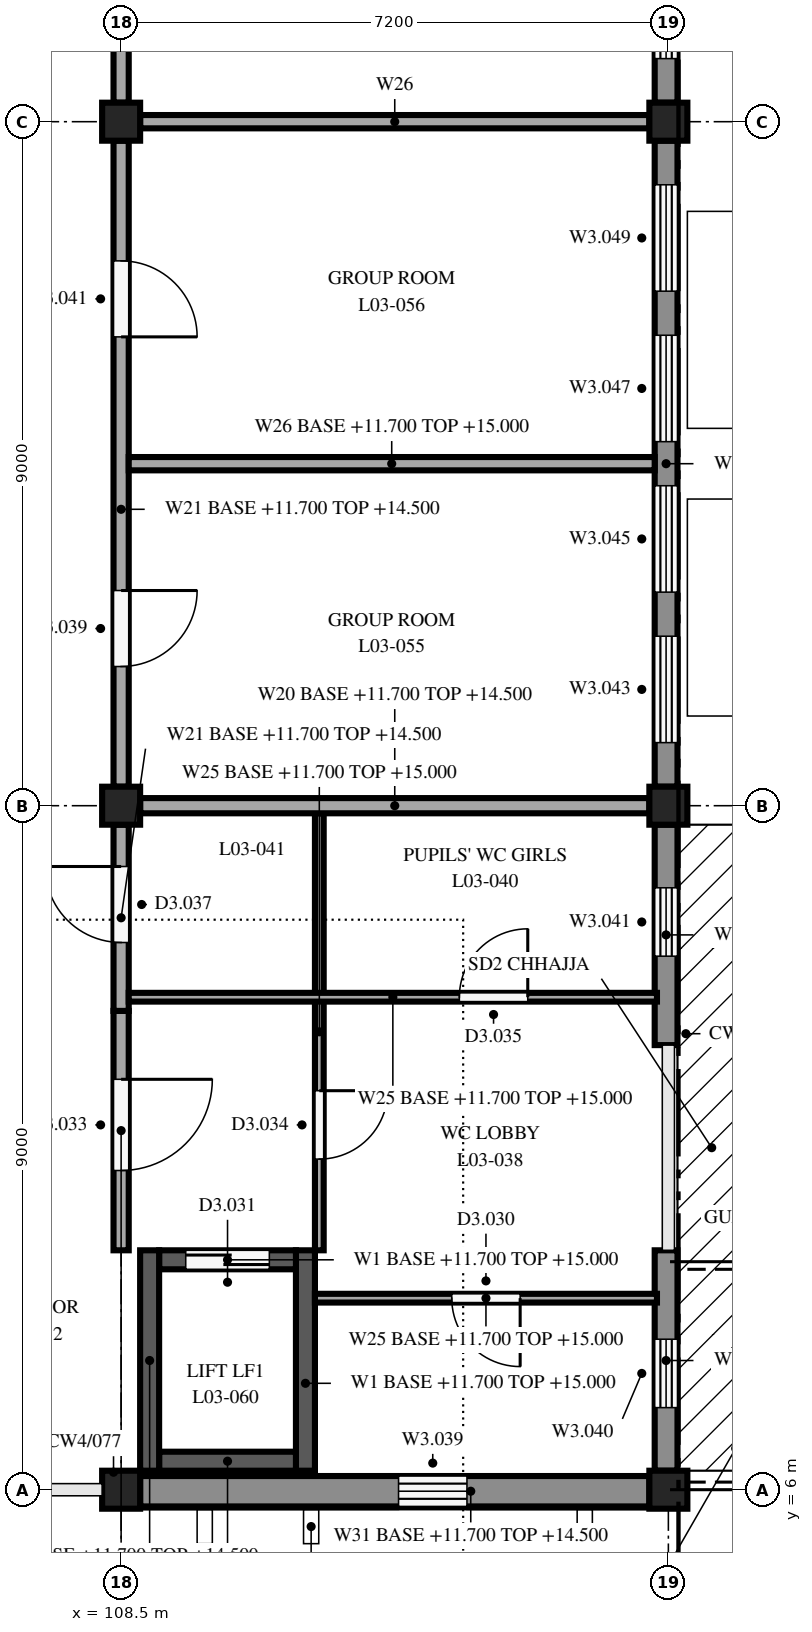
"""IFC4 building model, lengths in metres.
Left out: names, types, materials, properties, quantities, classifications, styles, units other than length and angle.
Written with IfcOpenShell. Run it as: python <this file> out.ifc"""

import sys

from ifc_helpers import new_model, si_unit, direction, frame, frame_2d, origin, origin_2d, place, context, subcontext, project, spatial, rectangle, extrude, element, fill, save


model = new_model("IFC4")
c1 = context("Model", 3, precision=1e-05, world=origin(), true_north=direction((0.0, 1.0)))
c2 = subcontext(c1, "Body", "Model", "MODEL_VIEW")
j1 = project(units=[si_unit("LENGTHUNIT", "METRE"), si_unit("PLANEANGLEUNIT", "RADIAN")], contexts=[c1])
p1 = place(None, origin())
s1 = spatial("IfcSite", under=j1, at=p1, CompositionType="ELEMENT")
p2 = place(p1, origin())
s2 = spatial("IfcBuilding", under=s1, at=p2, CompositionType="ELEMENT")
p3 = place(p2, frame((0.0, 0.0, 11.7)))
s3 = spatial("IfcBuildingStorey", under=s2, at=p3, CompositionType="ELEMENT", Elevation=11.7)
for number, where, z_axis, x_axis in (
    (1, (108.5, 6.0, 0.0), (0.0, 0.0, 1.0), (1.0, 0.0, 0.0)),
    (2, (108.5, 15.0, 0.0), (0.0, 0.0, 1.0), (1.0, 0.0, 0.0)),
    (3, (108.5, 24.0, 0.0), (0.0, 0.0, 1.0), (1.0, 0.0, 0.0)),
    (4, (115.7, 6.0, 0.0), (0.0, 0.0, 1.0), (1.0, 0.0, 0.0)),
    (5, (115.7, 15.0, 0.0), (0.0, 0.0, 1.0), (1.0, 0.0, 0.0)),
    (6, (115.7, 24.0, 0.0), (0.0, 0.0, 1.0), (1.0, 0.0, 0.0)),
):
    element("IfcColumn", number, at=place(p3, frame(where, z_axis=z_axis, x_axis=x_axis)), inside=s3, PredefinedType="COLUMN", context=c2, shape_type="SweptSolid", body=[
        extrude(rectangle(XDim=0.5, YDim=0.5, at=origin_2d()), origin(), (0.0, 0.0, 1.0), 3.3),
    ])
for number, where, z_axis, x_axis in (
    (7, (108.875, 6.25, 0.0), (0.0, 0.0, 1.0), (0.0, 1.0, 0.0)),
    (8, (110.925, 6.25, 0.0), (0.0, 0.0, 1.0), (0.0, 1.0, 0.0)),
):
    element("IfcWall", number, at=place(p3, frame(where, z_axis=z_axis, x_axis=x_axis)), inside=s3, PredefinedType="SHEAR", context=c2, shape_type="SweptSolid", body=[
        extrude(rectangle(XDim=2.9, YDim=0.25, at=frame_2d((1.45, 0.0))), origin(), (0.0, 0.0, 1.0), 3.3),
    ])
p4 = place(p3, frame((109.0, 6.375, 0.0), z_axis=(0.0, 0.0, 1.0), x_axis=(1.0, 0.0, 0.0)))
e9 = element("IfcWall", 9, at=p4, inside=s3, PredefinedType="SHEAR", context=c2, shape_type="SweptSolid", body=[
    extrude(rectangle(XDim=1.8, YDim=0.25, at=frame_2d((0.9, 0.0))), origin(), (0.0, 0.0, 1.0), 3.3),
])
p5 = place(p3, frame((109.0, 9.025, 0.0), z_axis=(0.0, 0.0, 1.0), x_axis=(1.0, 0.0, 0.0)))
e10 = element("IfcWall", 10, at=p5, inside=s3, PredefinedType="SHEAR", context=c2, shape_type="SweptSolid", body=[
    extrude(rectangle(XDim=1.8, YDim=0.25, at=frame_2d((0.9, 0.0))), origin(), (0.0, 0.0, 1.0), 3.3),
])
p6 = place(p5, frame((0.35, 0.0, 0.0)))
e11 = element("IfcOpeningElement", 11, at=p6, cuts=e10, PredefinedType="OPENING", context=c2, shape_type="SweptSolid", body=[
    extrude(rectangle(XDim=1.1, YDim=2.1, at=frame_2d((0.55, 1.05))), frame((0.0, 0.135, 0.0), z_axis=(0.0, -1.0, 0.0), x_axis=(1.0, 0.0, 0.0)), (0.0, 0.0, 1.0), 0.27),
])
p7 = place(p3, frame((115.67, 9.15, 0.0), z_axis=(0.0, 0.0, 1.0), x_axis=(0.0, -1.0, 0.0)))
e12 = element("IfcWall", 12, at=p7, inside=s3, PredefinedType="STANDARD", context=c2, shape_type="SweptSolid", body=[
    extrude(rectangle(XDim=2.9, YDim=0.3, at=frame_2d((1.45, 0.0))), origin(), (0.0, 0.0, 1.0), 2.75),
])
p8 = place(p7, frame((1.17, 0.0, 1.6)))
e13 = element("IfcOpeningElement", 13, at=p8, cuts=e12, PredefinedType="OPENING", context=c2, shape_type="SweptSolid", body=[
    extrude(rectangle(XDim=0.9, YDim=1.0, at=frame_2d((0.45, 0.5))), frame((0.0, 0.16, 0.0), z_axis=(0.0, -1.0, 0.0), x_axis=(1.0, 0.0, 0.0)), (0.0, 0.0, 1.0), 0.32),
])
p9 = place(p3, frame((115.67, 14.75, 0.0), z_axis=(0.0, 0.0, 1.0), x_axis=(0.0, -1.0, 0.0)))
e14 = element("IfcWall", 14, at=p9, inside=s3, PredefinedType="STANDARD", context=c2, shape_type="SweptSolid", body=[
    extrude(rectangle(XDim=2.9, YDim=0.3, at=frame_2d((1.45, 0.0))), origin(), (0.0, 0.0, 1.0), 2.75),
])
p10 = place(p9, frame((0.83, 0.0, 1.6)))
e15 = element("IfcOpeningElement", 15, at=p10, cuts=e14, PredefinedType="OPENING", context=c2, shape_type="SweptSolid", body=[
    extrude(rectangle(XDim=0.9, YDim=1.0, at=frame_2d((0.45, 0.5))), frame((0.0, 0.16, 0.0), z_axis=(0.0, -1.0, 0.0), x_axis=(1.0, 0.0, 0.0)), (0.0, 0.0, 1.0), 0.32),
])
p11 = place(p3, frame((115.67, 23.75, 0.0), z_axis=(0.0, 0.0, 1.0), x_axis=(0.0, -1.0, 0.0)))
e16 = element("IfcWall", 16, at=p11, inside=s3, PredefinedType="STANDARD", context=c2, shape_type="SweptSolid", body=[
    extrude(rectangle(XDim=8.5, YDim=0.3, at=frame_2d((4.25, 0.0))), origin(), (0.0, 0.0, 1.0), 2.75),
])
p12 = place(p11, frame((6.52, 0.0, 0.6)))
e17 = element("IfcOpeningElement", 17, at=p12, cuts=e16, PredefinedType="OPENING", context=c2, shape_type="SweptSolid", body=[
    extrude(rectangle(XDim=1.4, YDim=2.1, at=frame_2d((0.7, 1.05))), frame((0.0, 0.16, 0.0), z_axis=(0.0, -1.0, 0.0), x_axis=(1.0, 0.0, 0.0)), (0.0, 0.0, 1.0), 0.32),
])
p13 = place(p11, frame((4.54, 0.0, 0.6)))
e18 = element("IfcOpeningElement", 18, at=p13, cuts=e16, PredefinedType="OPENING", context=c2, shape_type="SweptSolid", body=[
    extrude(rectangle(XDim=1.4, YDim=2.1, at=frame_2d((0.7, 1.05))), frame((0.0, 0.16, 0.0), z_axis=(0.0, -1.0, 0.0), x_axis=(1.0, 0.0, 0.0)), (0.0, 0.0, 1.0), 0.32),
])
p14 = place(p11, frame((2.56, 0.0, 0.6)))
e19 = element("IfcOpeningElement", 19, at=p14, cuts=e16, PredefinedType="OPENING", context=c2, shape_type="SweptSolid", body=[
    extrude(rectangle(XDim=1.4, YDim=2.1, at=frame_2d((0.7, 1.05))), frame((0.0, 0.16, 0.0), z_axis=(0.0, -1.0, 0.0), x_axis=(1.0, 0.0, 0.0)), (0.0, 0.0, 1.0), 0.32),
])
p15 = place(p11, frame((0.58, 0.0, 0.6)))
e20 = element("IfcOpeningElement", 20, at=p15, cuts=e16, PredefinedType="OPENING", context=c2, shape_type="SweptSolid", body=[
    extrude(rectangle(XDim=1.4, YDim=2.1, at=frame_2d((0.7, 1.05))), frame((0.0, 0.16, 0.0), z_axis=(0.0, -1.0, 0.0), x_axis=(1.0, 0.0, 0.0)), (0.0, 0.0, 1.0), 0.32),
])
p16 = place(p3, frame((115.67, 32.75, 0.0), z_axis=(0.0, 0.0, 1.0), x_axis=(0.0, -1.0, 0.0)))
e21 = element("IfcWall", 21, at=p16, inside=s3, PredefinedType="STANDARD", context=c2, shape_type="SweptSolid", body=[
    extrude(rectangle(XDim=8.5, YDim=0.3, at=frame_2d((4.25, 0.0))), origin(), (0.0, 0.0, 1.0), 2.75),
])
p17 = place(p16, frame((6.52, 0.0, 0.6)))
e22 = element("IfcOpeningElement", 22, at=p17, cuts=e21, PredefinedType="OPENING", context=c2, shape_type="SweptSolid", body=[
    extrude(rectangle(XDim=1.4, YDim=2.1, at=frame_2d((0.7, 1.05))), frame((0.0, 0.16, 0.0), z_axis=(0.0, -1.0, 0.0), x_axis=(1.0, 0.0, 0.0)), (0.0, 0.0, 1.0), 0.32),
])
p18 = place(p16, frame((4.54, 0.0, 0.6)))
e23 = element("IfcOpeningElement", 23, at=p18, cuts=e21, PredefinedType="OPENING", context=c2, shape_type="SweptSolid", body=[
    extrude(rectangle(XDim=1.4, YDim=2.1, at=frame_2d((0.7, 1.05))), frame((0.0, 0.16, 0.0), z_axis=(0.0, -1.0, 0.0), x_axis=(1.0, 0.0, 0.0)), (0.0, 0.0, 1.0), 0.32),
])
p19 = place(p16, frame((2.56, 0.0, 0.6)))
e24 = element("IfcOpeningElement", 24, at=p19, cuts=e21, PredefinedType="OPENING", context=c2, shape_type="SweptSolid", body=[
    extrude(rectangle(XDim=1.4, YDim=2.1, at=frame_2d((0.7, 1.05))), frame((0.0, 0.16, 0.0), z_axis=(0.0, -1.0, 0.0), x_axis=(1.0, 0.0, 0.0)), (0.0, 0.0, 1.0), 0.32),
])
p20 = place(p16, frame((0.58, 0.0, 0.6)))
e25 = element("IfcOpeningElement", 25, at=p20, cuts=e21, PredefinedType="OPENING", context=c2, shape_type="SweptSolid", body=[
    extrude(rectangle(XDim=1.4, YDim=2.1, at=frame_2d((0.7, 1.05))), frame((0.0, 0.16, 0.0), z_axis=(0.0, -1.0, 0.0), x_axis=(1.0, 0.0, 0.0)), (0.0, 0.0, 1.0), 0.32),
])
p21 = place(p3, frame((115.45, 5.98, 0.0), z_axis=(0.0, 0.0, 1.0), x_axis=(-1.0, 0.0, 0.0)))
e26 = element("IfcWall", 26, at=p21, inside=s3, PredefinedType="STANDARD", context=c2, shape_type="SweptSolid", body=[
    extrude(rectangle(XDim=6.7, YDim=0.4, at=frame_2d((3.35, 0.0))), origin(), (0.0, 0.0, 1.0), 2.8),
])
p22 = place(p21, frame((2.4, 0.0, 1.6)))
e27 = element("IfcOpeningElement", 27, at=p22, cuts=e26, PredefinedType="OPENING", context=c2, shape_type="SweptSolid", body=[
    extrude(rectangle(XDim=0.9, YDim=1.0, at=frame_2d((0.45, 0.5))), frame((0.0, 0.21, 0.0), z_axis=(0.0, -1.0, 0.0), x_axis=(1.0, 0.0, 0.0)), (0.0, 0.0, 1.0), 0.42),
])
p23 = place(p3, frame((108.5, 12.3, 0.0), z_axis=(0.0, 0.0, 1.0), x_axis=(0.0, -1.0, 0.0)))
e28 = element("IfcWall", 28, at=p23, inside=s3, PredefinedType="PARTITIONING", context=c2, shape_type="SweptSolid", body=[
    extrude(rectangle(XDim=3.15, YDim=0.2, at=frame_2d((1.575, 0.0))), origin(), (0.0, 0.0, 1.0), 2.8),
])
p24 = place(p23, frame((0.9, 0.0, 0.0)))
e29 = element("IfcOpeningElement", 29, at=p24, cuts=e28, PredefinedType="OPENING", context=c2, shape_type="SweptSolid", body=[
    extrude(rectangle(XDim=1.2, YDim=2.1, at=frame_2d((0.6, 1.05))), frame((0.0, 0.11, 0.0), z_axis=(0.0, -1.0, 0.0), x_axis=(1.0, 0.0, 0.0)), (0.0, 0.0, 1.0), 0.22),
])
p25 = place(p3, frame((108.5, 12.3, 0.0), z_axis=(0.0, 0.0, 1.0), x_axis=(0.0, 1.0, 0.0)))
e30 = element("IfcWall", 30, at=p25, inside=s3, PredefinedType="PARTITIONING", context=c2, shape_type="SweptSolid", body=[
    extrude(rectangle(XDim=2.45, YDim=0.2, at=frame_2d((1.225, 0.0))), origin(), (0.0, 0.0, 1.0), 2.8),
])
p26 = place(p25, frame((0.9, 0.0, 0.0)))
e31 = element("IfcOpeningElement", 31, at=p26, cuts=e30, PredefinedType="OPENING", context=c2, shape_type="SweptSolid", body=[
    extrude(rectangle(XDim=1.0, YDim=2.1, at=frame_2d((0.5, 1.05))), frame((0.0, 0.11, 0.0), z_axis=(0.0, -1.0, 0.0), x_axis=(1.0, 0.0, 0.0)), (0.0, 0.0, 1.0), 0.22),
])
p27 = place(p3, frame((108.75, 15.0, 0.0), z_axis=(0.0, 0.0, 1.0), x_axis=(1.0, 0.0, 0.0)))
e32 = element("IfcWall", 32, at=p27, inside=s3, PredefinedType="PARTITIONING", context=c2, shape_type="SweptSolid", body=[
    extrude(rectangle(XDim=6.7, YDim=0.2, at=frame_2d((3.35, 0.0))), origin(), (0.0, 0.0, 1.0), 2.8),
])
p28 = place(p3, frame((111.107, 14.9, 0.0), z_axis=(0.0, 0.0, 1.0), x_axis=(0.0, -1.0, 0.0)))
e33 = element("IfcWall", 33, at=p28, inside=s3, PredefinedType="PARTITIONING", context=c2, shape_type="SweptSolid", body=[
    extrude(rectangle(XDim=5.75, YDim=0.115, at=frame_2d((2.875, 0.0))), origin(), (0.0, 0.0, 1.0), 3.3),
])
p29 = place(p28, frame((3.65, 0.0, 0.0)))
e34 = element("IfcOpeningElement", 34, at=p29, cuts=e33, PredefinedType="OPENING", context=c2, shape_type="SweptSolid", body=[
    extrude(rectangle(XDim=0.9, YDim=2.1, at=frame_2d((0.45, 1.05))), frame((0.0, 0.067, 0.0), z_axis=(0.0, -1.0, 0.0), x_axis=(1.0, 0.0, 0.0)), (0.0, 0.0, 1.0), 0.135),
])
p30 = place(p3, frame((115.55, 8.52, 0.0), z_axis=(0.0, 0.0, 1.0), x_axis=(-1.0, 0.0, 0.0)))
e35 = element("IfcWall", 35, at=p30, inside=s3, PredefinedType="PARTITIONING", context=c2, shape_type="SweptSolid", body=[
    extrude(rectangle(XDim=4.5, YDim=0.115, at=frame_2d((2.25, 0.0))), origin(), (0.0, 0.0, 1.0), 3.3),
])
p31 = place(p30, frame((1.8, 0.0, 0.0)))
e36 = element("IfcOpeningElement", 36, at=p31, cuts=e35, PredefinedType="OPENING", context=c2, shape_type="SweptSolid", body=[
    extrude(rectangle(XDim=0.9, YDim=2.1, at=frame_2d((0.45, 1.05))), frame((0.0, 0.067, 0.0), z_axis=(0.0, -1.0, 0.0), x_axis=(1.0, 0.0, 0.0)), (0.0, 0.0, 1.0), 0.135),
])
p32 = place(p3, frame((108.6, 12.48, 0.0), z_axis=(0.0, 0.0, 1.0), x_axis=(1.0, 0.0, 0.0)))
e37 = element("IfcWall", 37, at=p32, inside=s3, PredefinedType="PARTITIONING", context=c2, shape_type="SweptSolid", body=[
    extrude(rectangle(XDim=6.95, YDim=0.115, at=frame_2d((3.475, 0.0))), origin(), (0.0, 0.0, 1.0), 3.3),
])
p33 = place(p32, frame((4.35, 0.0, 0.0)))
e38 = element("IfcOpeningElement", 38, at=p33, cuts=e37, PredefinedType="OPENING", context=c2, shape_type="SweptSolid", body=[
    extrude(rectangle(XDim=0.9, YDim=2.1, at=frame_2d((0.45, 1.05))), frame((0.0, 0.067, 0.0), z_axis=(0.0, -1.0, 0.0), x_axis=(1.0, 0.0, 0.0)), (0.0, 0.0, 1.0), 0.135),
])
p34 = place(p3, frame((108.5, 23.75, 0.0), z_axis=(0.0, 0.0, 1.0), x_axis=(0.0, -1.0, 0.0)))
e39 = element("IfcWall", 39, at=p34, inside=s3, PredefinedType="PARTITIONING", context=c2, shape_type="SweptSolid", body=[
    extrude(rectangle(XDim=8.5, YDim=0.2, at=frame_2d((4.25, 0.0))), origin(), (0.0, 0.0, 1.0), 2.8),
])
p35 = place(p34, frame((5.919, 0.0, 0.0)))
e40 = element("IfcOpeningElement", 40, at=p35, cuts=e39, PredefinedType="OPENING", context=c2, shape_type="SweptSolid", body=[
    extrude(rectangle(XDim=1.0, YDim=2.1, at=frame_2d((0.5, 1.05))), frame((0.0, 0.11, 0.0), z_axis=(0.0, -1.0, 0.0), x_axis=(1.0, 0.0, 0.0)), (0.0, 0.0, 1.0), 0.22),
])
p36 = place(p34, frame((1.581, 0.0, 0.0)))
e41 = element("IfcOpeningElement", 41, at=p36, cuts=e39, PredefinedType="OPENING", context=c2, shape_type="SweptSolid", body=[
    extrude(rectangle(XDim=1.0, YDim=2.1, at=frame_2d((0.5, 1.05))), frame((0.0, 0.11, 0.0), z_axis=(0.0, -1.0, 0.0), x_axis=(1.0, 0.0, 0.0)), (0.0, 0.0, 1.0), 0.22),
])
p37 = place(p3, frame((108.5, 32.75, 0.0), z_axis=(0.0, 0.0, 1.0), x_axis=(0.0, -1.0, 0.0)))
e42 = element("IfcWall", 42, at=p37, inside=s3, PredefinedType="PARTITIONING", context=c2, shape_type="SweptSolid", body=[
    extrude(rectangle(XDim=8.5, YDim=0.2, at=frame_2d((4.25, 0.0))), origin(), (0.0, 0.0, 1.0), 2.8),
])
p38 = place(p37, frame((3.75, 0.0, 0.0)))
e43 = element("IfcOpeningElement", 43, at=p38, cuts=e42, PredefinedType="OPENING", context=c2, shape_type="SweptSolid", body=[
    extrude(rectangle(XDim=1.0, YDim=2.1, at=frame_2d((0.5, 1.05))), frame((0.0, 0.11, 0.0), z_axis=(0.0, -1.0, 0.0), x_axis=(1.0, 0.0, 0.0)), (0.0, 0.0, 1.0), 0.22),
])
p39 = place(p3, frame((108.6, 19.5, 0.0), z_axis=(0.0, 0.0, 1.0), x_axis=(1.0, 0.0, 0.0)))
e44 = element("IfcWall", 44, at=p39, inside=s3, PredefinedType="PARTITIONING", context=c2, shape_type="SweptSolid", body=[
    extrude(rectangle(XDim=6.92, YDim=0.175, at=frame_2d((3.46, 0.0))), origin(), (0.0, 0.0, 1.0), 3.3),
])
p40 = place(p3, frame((108.75, 24.0, 0.0), z_axis=(0.0, 0.0, 1.0), x_axis=(1.0, 0.0, 0.0)))
e45 = element("IfcWall", 45, at=p40, inside=s3, PredefinedType="PARTITIONING", context=c2, shape_type="SweptSolid", body=[
    extrude(rectangle(XDim=6.7, YDim=0.175, at=frame_2d((3.35, 0.0))), origin(), (0.0, 0.0, 1.0), 2.8),
])
p41 = place(p8, origin())
e46 = element("IfcWindow", 46, at=p41, inside=s3, PartitioningType="SINGLE_PANEL", PredefinedType="WINDOW", context=c2, shape_type="SweptSolid", body=[
    extrude(rectangle(XDim=0.9, YDim=1.0, at=frame_2d((0.45, 0.5))), frame((0.0, 0.03, 0.0), z_axis=(0.0, -1.0, 0.0), x_axis=(1.0, 0.0, 0.0)), (0.0, 0.0, 1.0), 0.06),
])
fill(e13, e46)
p42 = place(p10, origin())
e47 = element("IfcWindow", 47, at=p42, inside=s3, PartitioningType="SINGLE_PANEL", PredefinedType="WINDOW", context=c2, shape_type="SweptSolid", body=[
    extrude(rectangle(XDim=0.9, YDim=1.0, at=frame_2d((0.45, 0.5))), frame((0.0, 0.03, 0.0), z_axis=(0.0, -1.0, 0.0), x_axis=(1.0, 0.0, 0.0)), (0.0, 0.0, 1.0), 0.06),
])
fill(e15, e47)
p43 = place(p12, origin())
e48 = element("IfcWindow", 48, at=p43, inside=s3, PartitioningType="DOUBLE_PANEL_VERTICAL", PredefinedType="WINDOW", context=c2, shape_type="SweptSolid", body=[
    extrude(rectangle(XDim=1.4, YDim=2.1, at=frame_2d((0.7, 1.05))), frame((0.0, 0.03, 0.0), z_axis=(0.0, -1.0, 0.0), x_axis=(1.0, 0.0, 0.0)), (0.0, 0.0, 1.0), 0.06),
])
fill(e17, e48)
p44 = place(p13, origin())
e49 = element("IfcWindow", 49, at=p44, inside=s3, PartitioningType="DOUBLE_PANEL_VERTICAL", PredefinedType="WINDOW", context=c2, shape_type="SweptSolid", body=[
    extrude(rectangle(XDim=1.4, YDim=2.1, at=frame_2d((0.7, 1.05))), frame((0.0, 0.03, 0.0), z_axis=(0.0, -1.0, 0.0), x_axis=(1.0, 0.0, 0.0)), (0.0, 0.0, 1.0), 0.06),
])
fill(e18, e49)
p45 = place(p14, origin())
e50 = element("IfcWindow", 50, at=p45, inside=s3, PartitioningType="DOUBLE_PANEL_VERTICAL", PredefinedType="WINDOW", context=c2, shape_type="SweptSolid", body=[
    extrude(rectangle(XDim=1.4, YDim=2.1, at=frame_2d((0.7, 1.05))), frame((0.0, 0.03, 0.0), z_axis=(0.0, -1.0, 0.0), x_axis=(1.0, 0.0, 0.0)), (0.0, 0.0, 1.0), 0.06),
])
fill(e19, e50)
p46 = place(p15, origin())
e51 = element("IfcWindow", 51, at=p46, inside=s3, PartitioningType="DOUBLE_PANEL_VERTICAL", PredefinedType="WINDOW", context=c2, shape_type="SweptSolid", body=[
    extrude(rectangle(XDim=1.4, YDim=2.1, at=frame_2d((0.7, 1.05))), frame((0.0, 0.03, 0.0), z_axis=(0.0, -1.0, 0.0), x_axis=(1.0, 0.0, 0.0)), (0.0, 0.0, 1.0), 0.06),
])
fill(e20, e51)
p47 = place(p17, origin())
e52 = element("IfcWindow", 52, at=p47, inside=s3, PartitioningType="DOUBLE_PANEL_VERTICAL", PredefinedType="WINDOW", context=c2, shape_type="SweptSolid", body=[
    extrude(rectangle(XDim=1.4, YDim=2.1, at=frame_2d((0.7, 1.05))), frame((0.0, 0.03, 0.0), z_axis=(0.0, -1.0, 0.0), x_axis=(1.0, 0.0, 0.0)), (0.0, 0.0, 1.0), 0.06),
])
fill(e22, e52)
p48 = place(p22, origin())
e53 = element("IfcWindow", 53, at=p48, inside=s3, PartitioningType="SINGLE_PANEL", PredefinedType="WINDOW", context=c2, shape_type="SweptSolid", body=[
    extrude(rectangle(XDim=0.9, YDim=1.0, at=frame_2d((0.45, 0.5))), frame((0.0, 0.03, 0.0), z_axis=(0.0, -1.0, 0.0), x_axis=(1.0, 0.0, 0.0)), (0.0, 0.0, 1.0), 0.06),
])
fill(e27, e53)
p49 = place(p24, origin())
e54 = element("IfcDoor", 54, at=p49, inside=s3, OperationType="SINGLE_SWING_LEFT", PredefinedType="DOOR", context=c2, shape_type="SweptSolid", body=[
    extrude(rectangle(XDim=1.2, YDim=2.1, at=frame_2d((0.6, 1.05))), frame((0.0, 0.025, 0.0), z_axis=(0.0, -1.0, 0.0), x_axis=(1.0, 0.0, 0.0)), (0.0, 0.0, 1.0), 0.05),
])
fill(e29, e54)
p50 = place(p26, origin())
e55 = element("IfcDoor", 55, at=p50, inside=s3, OperationType="SINGLE_SWING_RIGHT", PredefinedType="DOOR", context=c2, shape_type="SweptSolid", body=[
    extrude(rectangle(XDim=1.0, YDim=2.1, at=frame_2d((0.5, 1.05))), frame((0.0, 0.025, 0.0), z_axis=(0.0, -1.0, 0.0), x_axis=(1.0, 0.0, 0.0)), (0.0, 0.0, 1.0), 0.05),
])
fill(e31, e55)
p51 = place(p29, origin())
e56 = element("IfcDoor", 56, at=p51, inside=s3, OperationType="SINGLE_SWING_LEFT", PredefinedType="DOOR", context=c2, shape_type="SweptSolid", body=[
    extrude(rectangle(XDim=0.9, YDim=2.1, at=frame_2d((0.45, 1.05))), frame((0.0, 0.025, 0.0), z_axis=(0.0, -1.0, 0.0), x_axis=(1.0, 0.0, 0.0)), (0.0, 0.0, 1.0), 0.05),
])
fill(e34, e56)
p52 = place(p31, origin())
e57 = element("IfcDoor", 57, at=p52, inside=s3, OperationType="SINGLE_SWING_LEFT", PredefinedType="DOOR", context=c2, shape_type="SweptSolid", body=[
    extrude(rectangle(XDim=0.9, YDim=2.1, at=frame_2d((0.45, 1.05))), frame((0.0, 0.025, 0.0), z_axis=(0.0, -1.0, 0.0), x_axis=(1.0, 0.0, 0.0)), (0.0, 0.0, 1.0), 0.05),
])
fill(e36, e57)
p53 = place(p33, origin())
e58 = element("IfcDoor", 58, at=p53, inside=s3, OperationType="SINGLE_SWING_RIGHT", PredefinedType="DOOR", context=c2, shape_type="SweptSolid", body=[
    extrude(rectangle(XDim=0.9, YDim=2.1, at=frame_2d((0.45, 1.05))), frame((0.0, 0.025, 0.0), z_axis=(0.0, -1.0, 0.0), x_axis=(1.0, 0.0, 0.0)), (0.0, 0.0, 1.0), 0.05),
])
fill(e38, e58)
p54 = place(p35, origin())
e59 = element("IfcDoor", 59, at=p54, inside=s3, OperationType="SINGLE_SWING_LEFT", PredefinedType="DOOR", context=c2, shape_type="SweptSolid", body=[
    extrude(rectangle(XDim=1.0, YDim=2.1, at=frame_2d((0.5, 1.05))), frame((0.0, 0.025, 0.0), z_axis=(0.0, -1.0, 0.0), x_axis=(1.0, 0.0, 0.0)), (0.0, 0.0, 1.0), 0.05),
])
fill(e40, e59)
p55 = place(p36, origin())
e60 = element("IfcDoor", 60, at=p55, inside=s3, OperationType="SINGLE_SWING_RIGHT", PredefinedType="DOOR", context=c2, shape_type="SweptSolid", body=[
    extrude(rectangle(XDim=1.0, YDim=2.1, at=frame_2d((0.5, 1.05))), frame((0.0, 0.025, 0.0), z_axis=(0.0, -1.0, 0.0), x_axis=(1.0, 0.0, 0.0)), (0.0, 0.0, 1.0), 0.05),
])
fill(e41, e60)
p56 = place(p6, origin())
e61 = element("IfcDoor", 61, at=p56, inside=s3, OperationType="SLIDING_TO_LEFT", PredefinedType="DOOR", context=c2, shape_type="SweptSolid", body=[
    extrude(rectangle(XDim=1.1, YDim=2.1, at=frame_2d((0.55, 1.05))), frame((0.0, 0.025, 0.0), z_axis=(0.0, -1.0, 0.0), x_axis=(1.0, 0.0, 0.0)), (0.0, 0.0, 1.0), 0.05),
])
fill(e11, e61)
save(model, sys.argv[1])
